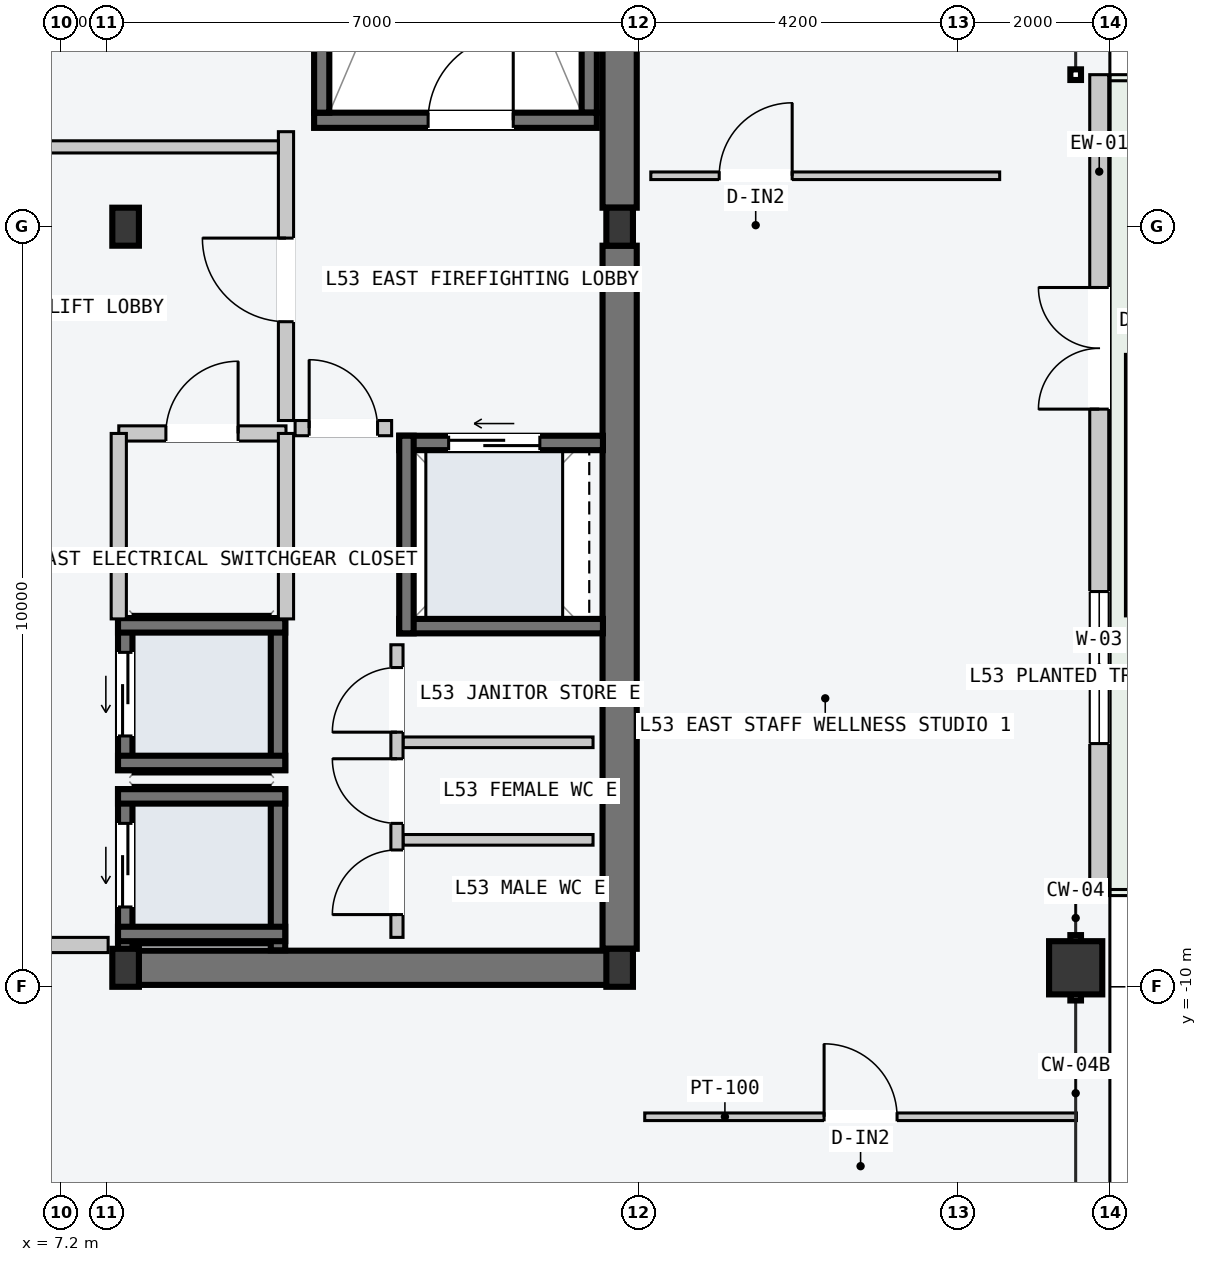
"""IFC4 building model, lengths in metres.
Left out: names, types, materials, properties, quantities, classifications, styles, units other than length and angle.
Written with IfcOpenShell. Run it as: python <this file> out.ifc"""

import sys

from ifc_helpers import new_model, si_unit, direction, frame, frame_2d, origin, origin_2d, place, context, subcontext, project, spatial, rectangle, hollow_rectangle, i_section, extrude, element, fill, save


model = new_model("IFC4")
c1 = context("Model", 3, precision=1e-05, world=origin(), true_north=direction((0.0, 1.0)))
c2 = subcontext(c1, "Body", "Model", "MODEL_VIEW")
j1 = project(units=[si_unit("LENGTHUNIT", "METRE"), si_unit("PLANEANGLEUNIT", "RADIAN")], contexts=[c1])
p1 = place(None, origin())
s1 = spatial("IfcSite", under=j1, at=p1, CompositionType="ELEMENT")
p2 = place(p1, origin())
s2 = spatial("IfcBuilding", under=s1, at=p2, CompositionType="ELEMENT")
p3 = place(p2, frame((0.0, 0.0, 201.9)))
s3 = spatial("IfcBuildingStorey", under=s2, at=p3, CompositionType="ELEMENT", Elevation=201.9)
p4 = place(p3, frame((8.07, -9.75, -0.2), z_axis=(0.0, 0.0, 1.0), x_axis=(1.0, 0.0, 0.0)))
e1 = element("IfcWall", 1, at=p4, inside=s3, PredefinedType="SHEAR", context=c2, shape_type="SweptSolid", body=[
    extrude(rectangle(XDim=6.46, YDim=0.45, at=frame_2d((3.23, 0.0))), origin(), (0.0, 0.0, 1.0), 3.6),
])
for number, where, z_axis, x_axis in (
    (2, (14.55, -9.5, -0.2), (0.0, 0.0, 1.0), (0.0, 1.0, 0.0)),
    (3, (14.55, 0.25, -0.2), (0.0, 0.0, 1.0), (0.0, 1.0, 0.0)),
):
    element("IfcWall", number, at=place(p3, frame(where, z_axis=z_axis, x_axis=x_axis)), inside=s3, PredefinedType="SHEAR", context=c2, shape_type="SweptSolid", body=[
        extrude(rectangle(XDim=9.25, YDim=0.45, at=frame_2d((4.625, 0.0))), origin(), (0.0, 0.0, 1.0), 3.6),
    ])
p5 = place(p3, frame((14.15, 1.5, -0.2), z_axis=(0.0, 0.0, 1.0), x_axis=(0.0, 1.0, 0.0)))
e4 = element("IfcWall", 4, at=p5, inside=s3, PredefinedType="SOLIDWALL", context=c2, shape_type="SweptSolid", body=[
    extrude(rectangle(XDim=7.8, YDim=0.2, at=frame_2d((3.9, 0.0))), origin(), (0.0, 0.0, 1.0), 3.6),
])
p6 = place(p3, frame((10.53, 1.4, -0.2), z_axis=(0.0, 0.0, 1.0), x_axis=(1.0, 0.0, 0.0)))
e5 = element("IfcWall", 5, at=p6, inside=s3, PredefinedType="SOLIDWALL", context=c2, shape_type="SweptSolid", body=[
    extrude(rectangle(XDim=3.72, YDim=0.2, at=frame_2d((1.86, 0.0))), origin(), (0.0, 0.0, 1.0), 3.6),
])
p7 = place(p6, frame((1.5, 0.0, 0.2)))
e6 = element("IfcOpeningElement", 6, at=p7, cuts=e5, PredefinedType="OPENING", context=c2, shape_type="SweptSolid", body=[
    extrude(rectangle(XDim=1.12, YDim=2.18, at=frame_2d((0.56, 1.09))), frame((0.0, 0.11, 0.0), z_axis=(0.0, -1.0, 0.0), x_axis=(1.0, 0.0, 0.0)), (0.0, 0.0, 1.0), 0.22),
])
p8 = place(p3, frame((10.63, 1.5, -0.2), z_axis=(0.0, 0.0, 1.0), x_axis=(0.0, 1.0, 0.0)))
e7 = element("IfcWall", 7, at=p8, inside=s3, PredefinedType="SOLIDWALL", context=c2, shape_type="SweptSolid", body=[
    extrude(rectangle(XDim=7.8, YDim=0.2, at=frame_2d((3.9, 0.0))), origin(), (0.0, 0.0, 1.0), 3.6),
])
for number, where, z_axis, x_axis in (
    (8, (8.05, -9.75, 0.0), (0.0, 0.0, 1.0), (1.0, 0.0, 0.0)),
    (9, (8.05, 0.0, 0.0), (0.0, 0.0, 1.0), (1.0, 0.0, 0.0)),
    (10, (14.55, -9.75, 0.0), (0.0, 0.0, 1.0), (1.0, 0.0, 0.0)),
    (11, (14.55, 0.0, 0.0), (0.0, 0.0, 1.0), (1.0, 0.0, 0.0)),
):
    element("IfcColumn", number, at=place(p3, frame(where, z_axis=z_axis, x_axis=x_axis)), inside=s3, PredefinedType="COLUMN", context=c2, shape_type="SweptSolid", body=[
        extrude(i_section(OverallWidth=0.35, OverallDepth=0.5, WebThickness=0.02, FlangeThickness=0.032, at=origin_2d()), origin(), (0.0, 0.0, 1.0), 3.6),
    ])
p9 = place(p3, frame((20.55, -9.75, 0.0), z_axis=(0.0, 0.0, 1.0), x_axis=(0.0, 1.0, 0.0)))
e12 = element("IfcColumn", 12, at=p9, inside=s3, PredefinedType="COLUMN", context=c2, shape_type="SweptSolid", body=[
    extrude(hollow_rectangle(XDim=0.7, YDim=0.7, WallThickness=0.03, at=origin_2d()), origin(), (0.0, 0.0, 1.0), 3.6),
])
p10 = place(p3, frame((20.86, -8.8, 0.0), z_axis=(0.0, 0.0, 1.0), x_axis=(0.0, 1.0, 0.0)))
e13 = element("IfcWall", 13, at=p10, inside=s3, PredefinedType="STANDARD", context=c2, shape_type="SweptSolid", body=[
    extrude(rectangle(XDim=10.8, YDim=0.25, at=frame_2d((5.4, 0.0))), origin(), (0.0, 0.0, 1.0), 3.4),
])
p11 = place(p10, frame((6.4, 0.0, 0.0)))
e14 = element("IfcOpeningElement", 14, at=p11, cuts=e13, PredefinedType="OPENING", context=c2, shape_type="SweptSolid", body=[
    extrude(rectangle(XDim=1.6, YDim=2.2, at=frame_2d((0.8, 1.1))), frame((0.0, 0.135, 0.0), z_axis=(0.0, -1.0, 0.0), x_axis=(1.0, 0.0, 0.0)), (0.0, 0.0, 1.0), 0.27),
])
p12 = place(p10, frame((2.0, 0.0, 0.85)))
e15 = element("IfcOpeningElement", 15, at=p12, cuts=e13, PredefinedType="OPENING", context=c2, shape_type="SweptSolid", body=[
    extrude(rectangle(XDim=2.0, YDim=2.1, at=frame_2d((1.0, 1.05))), frame((0.0, 0.135, 0.0), z_axis=(0.0, -1.0, 0.0), x_axis=(1.0, 0.0, 0.0)), (0.0, 0.0, 1.0), 0.27),
])
p13 = place(p3, frame((8.045, -9.52, -0.2), z_axis=(0.0, 0.0, 1.0), x_axis=(0.0, 1.0, 0.0)))
e16 = element("IfcWall", 16, at=p13, inside=s3, PredefinedType="SOLIDWALL", context=c2, shape_type="SweptSolid", body=[
    extrude(rectangle(XDim=2.12, YDim=0.19, at=frame_2d((1.06, 0.0))), origin(), (0.0, 0.0, 1.0), 3.6),
])
p14 = place(p13, frame((0.57, 0.0, 0.2)))
e17 = element("IfcOpeningElement", 17, at=p14, cuts=e16, PredefinedType="OPENING", context=c2, shape_type="SweptSolid", body=[
    extrude(rectangle(XDim=1.1, YDim=2.2, at=frame_2d((0.55, 1.1))), frame((0.0, 0.105, 0.0), z_axis=(0.0, -1.0, 0.0), x_axis=(1.0, 0.0, 0.0)), (0.0, 0.0, 1.0), 0.21),
])
p15 = place(p3, frame((10.055, -9.52, -0.2), z_axis=(0.0, 0.0, 1.0), x_axis=(0.0, 1.0, 0.0)))
e18 = element("IfcWall", 18, at=p15, inside=s3, PredefinedType="SOLIDWALL", context=c2, shape_type="SweptSolid", body=[
    extrude(rectangle(XDim=2.12, YDim=0.19, at=frame_2d((1.06, 0.0))), origin(), (0.0, 0.0, 1.0), 3.6),
])
for number, where, z_axis, x_axis in (
    (19, (7.95, -7.495, -0.2), (0.0, 0.0, 1.0), (1.0, 0.0, 0.0)),
    (20, (7.95, -9.305, -0.2), (0.0, 0.0, 1.0), (1.0, 0.0, 0.0)),
):
    element("IfcWall", number, at=place(p3, frame(where, z_axis=z_axis, x_axis=x_axis)), inside=s3, PredefinedType="SOLIDWALL", context=c2, shape_type="SweptSolid", body=[
        extrude(rectangle(XDim=2.2, YDim=0.19, at=frame_2d((1.1, 0.0))), origin(), (0.0, 0.0, 1.0), 3.6),
    ])
p16 = place(p3, frame((8.045, -7.15, -0.2), z_axis=(0.0, 0.0, 1.0), x_axis=(0.0, 1.0, 0.0)))
e21 = element("IfcWall", 21, at=p16, inside=s3, PredefinedType="SOLIDWALL", context=c2, shape_type="SweptSolid", body=[
    extrude(rectangle(XDim=2.0, YDim=0.19, at=frame_2d((1.0, 0.0))), origin(), (0.0, 0.0, 1.0), 3.6),
])
p17 = place(p16, frame((0.45, 0.0, 0.2)))
e22 = element("IfcOpeningElement", 22, at=p17, cuts=e21, PredefinedType="OPENING", context=c2, shape_type="SweptSolid", body=[
    extrude(rectangle(XDim=1.1, YDim=2.2, at=frame_2d((0.55, 1.1))), frame((0.0, 0.105, 0.0), z_axis=(0.0, -1.0, 0.0), x_axis=(1.0, 0.0, 0.0)), (0.0, 0.0, 1.0), 0.21),
])
p18 = place(p3, frame((10.055, -7.15, -0.2), z_axis=(0.0, 0.0, 1.0), x_axis=(0.0, 1.0, 0.0)))
e23 = element("IfcWall", 23, at=p18, inside=s3, PredefinedType="SOLIDWALL", context=c2, shape_type="SweptSolid", body=[
    extrude(rectangle(XDim=2.0, YDim=0.19, at=frame_2d((1.0, 0.0))), origin(), (0.0, 0.0, 1.0), 3.6),
])
for number, where, z_axis, x_axis in (
    (24, (7.95, -5.245, -0.2), (0.0, 0.0, 1.0), (1.0, 0.0, 0.0)),
    (25, (7.95, -7.055, -0.2), (0.0, 0.0, 1.0), (1.0, 0.0, 0.0)),
):
    element("IfcWall", number, at=place(p3, frame(where, z_axis=z_axis, x_axis=x_axis)), inside=s3, PredefinedType="SOLIDWALL", context=c2, shape_type="SweptSolid", body=[
        extrude(rectangle(XDim=2.2, YDim=0.19, at=frame_2d((1.1, 0.0))), origin(), (0.0, 0.0, 1.0), 3.6),
    ])
p19 = place(p3, frame((11.65, -2.845, -0.2), z_axis=(0.0, 0.0, 1.0), x_axis=(1.0, 0.0, 0.0)))
e26 = element("IfcWall", 26, at=p19, inside=s3, PredefinedType="SOLIDWALL", context=c2, shape_type="SweptSolid", body=[
    extrude(rectangle(XDim=2.68, YDim=0.19, at=frame_2d((1.34, 0.0))), origin(), (0.0, 0.0, 1.0), 3.6),
])
p20 = place(p19, frame((0.65, 0.0, 0.2)))
e27 = element("IfcOpeningElement", 27, at=p20, cuts=e26, PredefinedType="OPENING", context=c2, shape_type="SweptSolid", body=[
    extrude(rectangle(XDim=1.2, YDim=2.2, at=frame_2d((0.6, 1.1))), frame((0.0, 0.105, 0.0), z_axis=(0.0, -1.0, 0.0), x_axis=(1.0, 0.0, 0.0)), (0.0, 0.0, 1.0), 0.21),
])
p21 = place(p3, frame((11.65, -5.255, -0.2), z_axis=(0.0, 0.0, 1.0), x_axis=(1.0, 0.0, 0.0)))
e28 = element("IfcWall", 28, at=p21, inside=s3, PredefinedType="SOLIDWALL", context=c2, shape_type="SweptSolid", body=[
    extrude(rectangle(XDim=2.68, YDim=0.19, at=frame_2d((1.34, 0.0))), origin(), (0.0, 0.0, 1.0), 3.6),
])
p22 = place(p3, frame((11.745, -5.35, -0.2), z_axis=(0.0, 0.0, 1.0), x_axis=(0.0, 1.0, 0.0)))
e29 = element("IfcWall", 29, at=p22, inside=s3, PredefinedType="SOLIDWALL", context=c2, shape_type="SweptSolid", body=[
    extrude(rectangle(XDim=2.6, YDim=0.19, at=frame_2d((1.3, 0.0))), origin(), (0.0, 0.0, 1.0), 3.6),
])
p23 = place(p3, frame((6.02, -9.45, 0.0), z_axis=(0.0, 0.0, 1.0), x_axis=(1.0, 0.0, 0.0)))
e30 = element("IfcWall", 30, at=p23, inside=s3, PredefinedType="PARTITIONING", context=c2, shape_type="SweptSolid", body=[
    extrude(rectangle(XDim=1.8, YDim=0.2, at=frame_2d((0.9, 0.0))), origin(), (0.0, 0.0, 1.0), 3.4),
])
p24 = place(p3, frame((10.16, -2.55, 0.0), z_axis=(0.0, 0.0, 1.0), x_axis=(0.0, 1.0, 0.0)))
e31 = element("IfcWall", 31, at=p24, inside=s3, PredefinedType="PARTITIONING", context=c2, shape_type="SweptSolid", body=[
    extrude(rectangle(XDim=3.8, YDim=0.2, at=frame_2d((1.9, 0.0))), origin(), (0.0, 0.0, 1.0), 3.4),
])
p25 = place(p24, frame((1.3, 0.0, 0.0)))
e32 = element("IfcOpeningElement", 32, at=p25, cuts=e31, PredefinedType="OPENING", context=c2, shape_type="SweptSolid", body=[
    extrude(rectangle(XDim=1.1, YDim=2.15, at=frame_2d((0.55, 1.075))), frame((0.0, 0.11, 0.0), z_axis=(0.0, -1.0, 0.0), x_axis=(1.0, 0.0, 0.0)), (0.0, 0.0, 1.0), 0.22),
])
p26 = place(p3, frame((10.28, -2.65, 0.0), z_axis=(0.0, 0.0, 1.0), x_axis=(1.0, 0.0, 0.0)))
e33 = element("IfcWall", 33, at=p26, inside=s3, PredefinedType="PARTITIONING", context=c2, shape_type="SweptSolid", body=[
    extrude(rectangle(XDim=1.27, YDim=0.2, at=frame_2d((0.635, 0.0))), origin(), (0.0, 0.0, 1.0), 3.4),
])
p27 = place(p26, frame((0.185, 0.0, 0.0)))
e34 = element("IfcOpeningElement", 34, at=p27, cuts=e33, PredefinedType="OPENING", context=c2, shape_type="SweptSolid", body=[
    extrude(rectangle(XDim=0.9, YDim=2.15, at=frame_2d((0.45, 1.075))), frame((0.0, 0.11, 0.0), z_axis=(0.0, -1.0, 0.0), x_axis=(1.0, 0.0, 0.0)), (0.0, 0.0, 1.0), 0.22),
])
p28 = place(p3, frame((7.96, -2.72, 0.0), z_axis=(0.0, 0.0, 1.0), x_axis=(1.0, 0.0, 0.0)))
e35 = element("IfcWall", 35, at=p28, inside=s3, PredefinedType="PARTITIONING", context=c2, shape_type="SweptSolid", body=[
    extrude(rectangle(XDim=2.2, YDim=0.2, at=frame_2d((1.1, 0.0))), origin(), (0.0, 0.0, 1.0), 3.4),
])
p29 = place(p28, frame((0.62, 0.0, 0.0)))
e36 = element("IfcOpeningElement", 36, at=p29, cuts=e35, PredefinedType="OPENING", context=c2, shape_type="SweptSolid", body=[
    extrude(rectangle(XDim=0.95, YDim=2.1, at=frame_2d((0.475, 1.05))), frame((0.0, 0.11, 0.0), z_axis=(0.0, -1.0, 0.0), x_axis=(1.0, 0.0, 0.0)), (0.0, 0.0, 1.0), 0.22),
])
for number, where, z_axis, x_axis in (
    (37, (7.96, -5.16, 0.0), (0.0, 0.0, 1.0), (0.0, 1.0, 0.0)),
    (38, (10.16, -5.16, 0.0), (0.0, 0.0, 1.0), (0.0, 1.0, 0.0)),
):
    element("IfcWall", number, at=place(p3, frame(where, z_axis=z_axis, x_axis=x_axis)), inside=s3, PredefinedType="PARTITIONING", context=c2, shape_type="SweptSolid", body=[
        extrude(rectangle(XDim=2.44, YDim=0.2, at=frame_2d((1.22, 0.0))), origin(), (0.0, 0.0, 1.0), 3.4),
    ])
for number, where, z_axis, x_axis in (
    (39, (11.7, -8.067, 0.0), (0.0, 0.0, 1.0), (1.0, 0.0, 0.0)),
    (40, (11.7, -6.783, 0.0), (0.0, 0.0, 1.0), (1.0, 0.0, 0.0)),
):
    element("IfcWall", number, at=place(p3, frame(where, z_axis=z_axis, x_axis=x_axis)), inside=s3, PredefinedType="PARTITIONING", context=c2, shape_type="SweptSolid", body=[
        extrude(rectangle(XDim=2.5, YDim=0.14, at=frame_2d((1.25, 0.0))), origin(), (0.0, 0.0, 1.0), 3.4),
    ])
p30 = place(p3, frame((11.62, -9.35, 0.0), z_axis=(0.0, 0.0, 1.0), x_axis=(0.0, 1.0, 0.0)))
e41 = element("IfcWall", 41, at=p30, inside=s3, PredefinedType="PARTITIONING", context=c2, shape_type="SweptSolid", body=[
    extrude(rectangle(XDim=3.85, YDim=0.16, at=frame_2d((1.925, 0.0))), origin(), (0.0, 0.0, 1.0), 3.4),
])
p31 = place(p30, frame((0.3, 0.0, 0.0)))
e42 = element("IfcOpeningElement", 42, at=p31, cuts=e41, PredefinedType="OPENING", context=c2, shape_type="SweptSolid", body=[
    extrude(rectangle(XDim=0.85, YDim=2.12, at=frame_2d((0.425, 1.06))), frame((0.0, 0.09, 0.0), z_axis=(0.0, -1.0, 0.0), x_axis=(1.0, 0.0, 0.0)), (0.0, 0.0, 1.0), 0.18),
])
p32 = place(p30, frame((1.5, 0.0, 0.0)))
e43 = element("IfcOpeningElement", 43, at=p32, cuts=e41, PredefinedType="OPENING", context=c2, shape_type="SweptSolid", body=[
    extrude(rectangle(XDim=0.85, YDim=2.12, at=frame_2d((0.425, 1.06))), frame((0.0, 0.09, 0.0), z_axis=(0.0, -1.0, 0.0), x_axis=(1.0, 0.0, 0.0)), (0.0, 0.0, 1.0), 0.18),
])
p33 = place(p30, frame((2.7, 0.0, 0.0)))
e44 = element("IfcOpeningElement", 44, at=p33, cuts=e41, PredefinedType="OPENING", context=c2, shape_type="SweptSolid", body=[
    extrude(rectangle(XDim=0.85, YDim=2.12, at=frame_2d((0.425, 1.06))), frame((0.0, 0.09, 0.0), z_axis=(0.0, -1.0, 0.0), x_axis=(1.0, 0.0, 0.0)), (0.0, 0.0, 1.0), 0.18),
])
p34 = place(p3, frame((1.26, 1.05, 0.0), z_axis=(0.0, 0.0, 1.0), x_axis=(1.0, 0.0, 0.0)))
e45 = element("IfcWall", 45, at=p34, inside=s3, PredefinedType="PARTITIONING", context=c2, shape_type="SweptSolid", body=[
    extrude(rectangle(XDim=8.8, YDim=0.16, at=frame_2d((4.4, 0.0))), origin(), (0.0, 0.0, 1.0), 3.4),
])
p35 = place(p3, frame((14.88, -11.71, 0.0), z_axis=(0.0, 0.0, 1.0), x_axis=(1.0, 0.0, 0.0)))
e46 = element("IfcWall", 46, at=p35, inside=s3, PredefinedType="PARTITIONING", context=c2, shape_type="SweptSolid", body=[
    extrude(rectangle(XDim=5.68, YDim=0.1, at=frame_2d((2.84, 0.0))), origin(), (0.0, 0.0, 1.0), 3.4),
])
p36 = place(p35, frame((2.36, 0.0, 0.0)))
e47 = element("IfcOpeningElement", 47, at=p36, cuts=e46, PredefinedType="OPENING", context=c2, shape_type="SweptSolid", body=[
    extrude(rectangle(XDim=0.96, YDim=2.18, at=frame_2d((0.48, 1.09))), frame((0.0, 0.06, 0.0), z_axis=(0.0, -1.0, 0.0), x_axis=(1.0, 0.0, 0.0)), (0.0, 0.0, 1.0), 0.12),
])
p37 = place(p3, frame((14.96, 0.67, 0.0), z_axis=(0.0, 0.0, 1.0), x_axis=(1.0, 0.0, 0.0)))
e48 = element("IfcWall", 48, at=p37, inside=s3, PredefinedType="PARTITIONING", context=c2, shape_type="SweptSolid", body=[
    extrude(rectangle(XDim=4.59, YDim=0.1, at=frame_2d((2.295, 0.0))), origin(), (0.0, 0.0, 1.0), 3.4),
])
p38 = place(p37, frame((0.9, 0.0, 0.0)))
e49 = element("IfcOpeningElement", 49, at=p38, cuts=e48, PredefinedType="OPENING", context=c2, shape_type="SweptSolid", body=[
    extrude(rectangle(XDim=0.96, YDim=2.18, at=frame_2d((0.48, 1.09))), frame((0.0, 0.06, 0.0), z_axis=(0.0, -1.0, 0.0), x_axis=(1.0, 0.0, 0.0)), (0.0, 0.0, 1.0), 0.12),
])
p39 = place(p7, origin())
e50 = element("IfcDoor", 50, at=p39, inside=s3, OperationType="SINGLE_SWING_RIGHT", PredefinedType="DOOR", context=c2, shape_type="SweptSolid", body=[
    extrude(rectangle(XDim=1.12, YDim=2.18, at=frame_2d((0.56, 1.09))), frame((0.0, 0.025, 0.0), z_axis=(0.0, -1.0, 0.0), x_axis=(1.0, 0.0, 0.0)), (0.0, 0.0, 1.0), 0.05),
])
fill(e6, e50)
p40 = place(p11, origin())
e51 = element("IfcDoor", 51, at=p40, inside=s3, OperationType="DOUBLE_DOOR_SINGLE_SWING", PredefinedType="DOOR", context=c2, shape_type="SweptSolid", body=[
    extrude(rectangle(XDim=1.6, YDim=2.2, at=frame_2d((0.8, 1.1))), frame((0.0, 0.025, 0.0), z_axis=(0.0, -1.0, 0.0), x_axis=(1.0, 0.0, 0.0)), (0.0, 0.0, 1.0), 0.05),
])
fill(e14, e51)
p41 = place(p12, origin())
e52 = element("IfcWindow", 52, at=p41, inside=s3, PartitioningType="SINGLE_PANEL", PredefinedType="WINDOW", context=c2, shape_type="SweptSolid", body=[
    extrude(rectangle(XDim=2.0, YDim=2.1, at=frame_2d((1.0, 1.05))), frame((0.0, 0.03, 0.0), z_axis=(0.0, -1.0, 0.0), x_axis=(1.0, 0.0, 0.0)), (0.0, 0.0, 1.0), 0.06),
])
fill(e15, e52)
p42 = place(p14, origin())
e53 = element("IfcDoor", 53, at=p42, inside=s3, OperationType="SLIDING_TO_LEFT", PredefinedType="DOOR", context=c2, shape_type="SweptSolid", body=[
    extrude(rectangle(XDim=1.1, YDim=2.2, at=frame_2d((0.55, 1.1))), frame((0.0, 0.025, 0.0), z_axis=(0.0, -1.0, 0.0), x_axis=(1.0, 0.0, 0.0)), (0.0, 0.0, 1.0), 0.05),
])
fill(e17, e53)
p43 = place(p17, origin())
e54 = element("IfcDoor", 54, at=p43, inside=s3, OperationType="SLIDING_TO_LEFT", PredefinedType="DOOR", context=c2, shape_type="SweptSolid", body=[
    extrude(rectangle(XDim=1.1, YDim=2.2, at=frame_2d((0.55, 1.1))), frame((0.0, 0.025, 0.0), z_axis=(0.0, -1.0, 0.0), x_axis=(1.0, 0.0, 0.0)), (0.0, 0.0, 1.0), 0.05),
])
fill(e22, e54)
p44 = place(p20, origin())
e55 = element("IfcDoor", 55, at=p44, inside=s3, OperationType="SLIDING_TO_LEFT", PredefinedType="DOOR", context=c2, shape_type="SweptSolid", body=[
    extrude(rectangle(XDim=1.2, YDim=2.2, at=frame_2d((0.6, 1.1))), frame((0.0, 0.025, 0.0), z_axis=(0.0, -1.0, 0.0), x_axis=(1.0, 0.0, 0.0)), (0.0, 0.0, 1.0), 0.05),
])
fill(e27, e55)
p45 = place(p25, origin())
e56 = element("IfcDoor", 56, at=p45, inside=s3, OperationType="SINGLE_SWING_RIGHT", PredefinedType="DOOR", context=c2, shape_type="SweptSolid", body=[
    extrude(rectangle(XDim=1.1, YDim=2.15, at=frame_2d((0.55, 1.075))), frame((0.0, 0.025, 0.0), z_axis=(0.0, -1.0, 0.0), x_axis=(1.0, 0.0, 0.0)), (0.0, 0.0, 1.0), 0.05),
])
fill(e32, e56)
p46 = place(p27, origin())
e57 = element("IfcDoor", 57, at=p46, inside=s3, OperationType="SINGLE_SWING_LEFT", PredefinedType="DOOR", context=c2, shape_type="SweptSolid", body=[
    extrude(rectangle(XDim=0.9, YDim=2.15, at=frame_2d((0.45, 1.075))), frame((0.0, 0.025, 0.0), z_axis=(0.0, -1.0, 0.0), x_axis=(1.0, 0.0, 0.0)), (0.0, 0.0, 1.0), 0.05),
])
fill(e34, e57)
p47 = place(p29, origin())
e58 = element("IfcDoor", 58, at=p47, inside=s3, OperationType="SINGLE_SWING_RIGHT", PredefinedType="DOOR", context=c2, shape_type="SweptSolid", body=[
    extrude(rectangle(XDim=0.95, YDim=2.1, at=frame_2d((0.475, 1.05))), frame((0.0, 0.025, 0.0), z_axis=(0.0, -1.0, 0.0), x_axis=(1.0, 0.0, 0.0)), (0.0, 0.0, 1.0), 0.05),
])
fill(e36, e58)
p48 = place(p31, origin())
e59 = element("IfcDoor", 59, at=p48, inside=s3, OperationType="SINGLE_SWING_LEFT", PredefinedType="DOOR", context=c2, shape_type="SweptSolid", body=[
    extrude(rectangle(XDim=0.85, YDim=2.12, at=frame_2d((0.425, 1.06))), frame((0.0, 0.025, 0.0), z_axis=(0.0, -1.0, 0.0), x_axis=(1.0, 0.0, 0.0)), (0.0, 0.0, 1.0), 0.05),
])
fill(e42, e59)
p49 = place(p32, origin())
e60 = element("IfcDoor", 60, at=p49, inside=s3, OperationType="SINGLE_SWING_RIGHT", PredefinedType="DOOR", context=c2, shape_type="SweptSolid", body=[
    extrude(rectangle(XDim=0.85, YDim=2.12, at=frame_2d((0.425, 1.06))), frame((0.0, 0.025, 0.0), z_axis=(0.0, -1.0, 0.0), x_axis=(1.0, 0.0, 0.0)), (0.0, 0.0, 1.0), 0.05),
])
fill(e43, e60)
p50 = place(p33, origin())
e61 = element("IfcDoor", 61, at=p50, inside=s3, OperationType="SINGLE_SWING_LEFT", PredefinedType="DOOR", context=c2, shape_type="SweptSolid", body=[
    extrude(rectangle(XDim=0.85, YDim=2.12, at=frame_2d((0.425, 1.06))), frame((0.0, 0.025, 0.0), z_axis=(0.0, -1.0, 0.0), x_axis=(1.0, 0.0, 0.0)), (0.0, 0.0, 1.0), 0.05),
])
fill(e44, e61)
p51 = place(p36, origin())
e62 = element("IfcDoor", 62, at=p51, inside=s3, OperationType="SINGLE_SWING_LEFT", PredefinedType="DOOR", context=c2, shape_type="SweptSolid", body=[
    extrude(rectangle(XDim=0.96, YDim=2.18, at=frame_2d((0.48, 1.09))), frame((0.0, 0.025, 0.0), z_axis=(0.0, -1.0, 0.0), x_axis=(1.0, 0.0, 0.0)), (0.0, 0.0, 1.0), 0.05),
])
fill(e47, e62)
p52 = place(p38, origin())
e63 = element("IfcDoor", 63, at=p52, inside=s3, OperationType="SINGLE_SWING_RIGHT", PredefinedType="DOOR", context=c2, shape_type="SweptSolid", body=[
    extrude(rectangle(XDim=0.96, YDim=2.18, at=frame_2d((0.48, 1.09))), frame((0.0, 0.025, 0.0), z_axis=(0.0, -1.0, 0.0), x_axis=(1.0, 0.0, 0.0)), (0.0, 0.0, 1.0), 0.05),
])
fill(e49, e63)
save(model, sys.argv[1])
